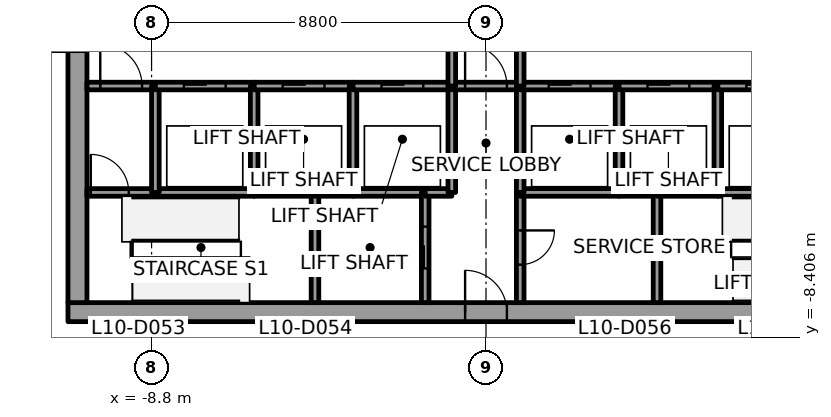
"""IFC4 building model, lengths in metres.
Left out: names, types, materials, properties, quantities, classifications, styles, units other than length and angle.
Written with IfcOpenShell. Run it as: python <this file> out.ifc"""

import sys

from ifc_helpers import new_model, si_unit, direction, frame, frame_2d, origin, place, context, subcontext, project, spatial, rectangle, extrude, element, fill, save


model = new_model("IFC4")
c1 = context("Model", 3, precision=1e-05, world=origin(), true_north=direction((0.0, 1.0)))
c2 = subcontext(c1, "Body", "Model", "MODEL_VIEW")
j1 = project(units=[si_unit("LENGTHUNIT", "METRE"), si_unit("PLANEANGLEUNIT", "RADIAN")], contexts=[c1])
p1 = place(None, origin())
s1 = spatial("IfcSite", under=j1, at=p1, CompositionType="ELEMENT")
p2 = place(p1, origin())
s2 = spatial("IfcBuilding", under=s1, at=p2, CompositionType="ELEMENT")
p3 = place(p2, frame((0.0, 0.0, 59.1)))
s3 = spatial("IfcBuildingStorey", under=s2, at=p3, CompositionType="ELEMENT", Elevation=59.1)
p4 = place(p3, frame((-11.0, -7.75, 0.0), z_axis=(0.0, 0.0, 1.0), x_axis=(1.0, 0.0, 0.0)))
e1 = element("IfcWall", 1, at=p4, inside=s3, PredefinedType="SHEAR", context=c2, shape_type="SweptSolid", body=[
    extrude(rectangle(XDim=22.0, YDim=0.5, at=frame_2d((11.0, 0.0))), origin(), (0.0, 0.0, 1.0), 3.7),
])
p5 = place(p4, frame((10.45, 0.0, 0.0)))
e2 = element("IfcOpeningElement", 2, at=p5, cuts=e1, PredefinedType="OPENING", context=c2, shape_type="SweptSolid", body=[
    extrude(rectangle(XDim=1.1, YDim=2.1, at=frame_2d((0.55, 1.05))), frame((0.0, 0.25, 0.0), z_axis=(0.0, -1.0, 0.0), x_axis=(1.0, 0.0, 0.0)), (0.0, 0.0, 1.0), 0.5),
])
p6 = place(p3, frame((-10.75, -7.5, 0.0), z_axis=(0.0, 0.0, 1.0), x_axis=(0.0, 1.0, 0.0)))
e3 = element("IfcWall", 3, at=p6, inside=s3, PredefinedType="SHEAR", context=c2, shape_type="SweptSolid", body=[
    extrude(rectangle(XDim=15.0, YDim=0.5, at=frame_2d((7.5, 0.0))), origin(), (0.0, 0.0, 1.0), 3.7),
])
p7 = place(p6, frame((6.6, 0.0, 0.0)))
e4 = element("IfcOpeningElement", 4, at=p7, cuts=e3, PredefinedType="OPENING", context=c2, shape_type="SweptSolid", body=[
    extrude(rectangle(XDim=1.8, YDim=2.1, at=frame_2d((0.9, 1.05))), frame((0.0, 0.25, 0.0), z_axis=(0.0, -1.0, 0.0), x_axis=(1.0, 0.0, 0.0)), (0.0, 0.0, 1.0), 0.5),
])
p8 = place(p3, frame((-10.5, -4.6, 0.0), z_axis=(0.0, 0.0, 1.0), x_axis=(1.0, 0.0, 0.0)))
e5 = element("IfcWall", 5, at=p8, inside=s3, PredefinedType="SOLIDWALL", context=c2, shape_type="SweptSolid", body=[
    extrude(rectangle(XDim=1.8, YDim=0.2, at=frame_2d((0.9, 0.0))), origin(), (0.0, 0.0, 1.0), 3.55),
])
p9 = place(p8, frame((0.1, 0.0, 0.0)))
e6 = element("IfcOpeningElement", 6, at=p9, cuts=e5, PredefinedType="OPENING", context=c2, shape_type="SweptSolid", body=[
    extrude(rectangle(XDim=1.0, YDim=2.1, at=frame_2d((0.5, 1.05))), frame((0.0, 0.1, 0.0), z_axis=(0.0, -1.0, 0.0), x_axis=(1.0, 0.0, 0.0)), (0.0, 0.0, 1.0), 0.2),
])
p10 = place(p3, frame((-10.5, -1.8, 0.0), z_axis=(0.0, 0.0, 1.0), x_axis=(1.0, 0.0, 0.0)))
e7 = element("IfcWall", 7, at=p10, inside=s3, PredefinedType="SOLIDWALL", context=c2, shape_type="SweptSolid", body=[
    extrude(rectangle(XDim=1.8, YDim=0.2, at=frame_2d((0.9, 0.0))), origin(), (0.0, 0.0, 1.0), 3.55),
])
p11 = place(p10, frame((0.35, 0.0, 0.0)))
e8 = element("IfcOpeningElement", 8, at=p11, cuts=e7, PredefinedType="OPENING", context=c2, shape_type="SweptSolid", body=[
    extrude(rectangle(XDim=1.1, YDim=2.1, at=frame_2d((0.55, 1.05))), frame((0.0, 0.1, 0.0), z_axis=(0.0, -1.0, 0.0), x_axis=(1.0, 0.0, 0.0)), (0.0, 0.0, 1.0), 0.2),
])
p12 = place(p3, frame((-8.7, -4.6, 0.0), z_axis=(0.0, 0.0, 1.0), x_axis=(1.0, 0.0, 0.0)))
e9 = element("IfcWall", 9, at=p12, inside=s3, PredefinedType="SOLIDWALL", context=c2, shape_type="SweptSolid", body=[
    extrude(rectangle(XDim=2.6, YDim=0.2, at=frame_2d((1.3, 0.0))), origin(), (0.0, 0.0, 1.0), 3.55),
])
p13 = place(p3, frame((-8.7, -4.6, 0.0), z_axis=(0.0, 0.0, 1.0), x_axis=(0.0, 1.0, 0.0)))
e10 = element("IfcWall", 10, at=p13, inside=s3, PredefinedType="SOLIDWALL", context=c2, shape_type="SweptSolid", body=[
    extrude(rectangle(XDim=2.8, YDim=0.2, at=frame_2d((1.4, 0.0))), origin(), (0.0, 0.0, 1.0), 3.55),
])
p14 = place(p3, frame((-8.7, -1.8, 0.0), z_axis=(0.0, 0.0, 1.0), x_axis=(1.0, 0.0, 0.0)))
e11 = element("IfcWall", 11, at=p14, inside=s3, PredefinedType="SOLIDWALL", context=c2, shape_type="SweptSolid", body=[
    extrude(rectangle(XDim=2.6, YDim=0.2, at=frame_2d((1.3, 0.0))), origin(), (0.0, 0.0, 1.0), 3.55),
])
p15 = place(p14, frame((0.75, 0.0, 0.0)))
e12 = element("IfcOpeningElement", 12, at=p15, cuts=e11, PredefinedType="OPENING", context=c2, shape_type="SweptSolid", body=[
    extrude(rectangle(XDim=1.1, YDim=2.1, at=frame_2d((0.55, 1.05))), frame((0.0, 0.1, 0.0), z_axis=(0.0, -1.0, 0.0), x_axis=(1.0, 0.0, 0.0)), (0.0, 0.0, 1.0), 0.2),
])
p16 = place(p3, frame((-6.1, -4.6, 0.0), z_axis=(0.0, 0.0, 1.0), x_axis=(1.0, 0.0, 0.0)))
e13 = element("IfcWall", 13, at=p16, inside=s3, PredefinedType="SOLIDWALL", context=c2, shape_type="SweptSolid", body=[
    extrude(rectangle(XDim=1.6, YDim=0.2, at=frame_2d((0.8, 0.0))), origin(), (0.0, 0.0, 1.0), 3.55),
])
p17 = place(p3, frame((-6.1, -4.6, 0.0), z_axis=(0.0, 0.0, 1.0), x_axis=(0.0, 1.0, 0.0)))
e14 = element("IfcWall", 14, at=p17, inside=s3, PredefinedType="SOLIDWALL", context=c2, shape_type="SweptSolid", body=[
    extrude(rectangle(XDim=2.8, YDim=0.2, at=frame_2d((1.4, 0.0))), origin(), (0.0, 0.0, 1.0), 3.55),
])
p18 = place(p3, frame((-6.1, -1.8, 0.0), z_axis=(0.0, 0.0, 1.0), x_axis=(1.0, 0.0, 0.0)))
e15 = element("IfcWall", 15, at=p18, inside=s3, PredefinedType="SOLIDWALL", context=c2, shape_type="SweptSolid", body=[
    extrude(rectangle(XDim=2.6, YDim=0.2, at=frame_2d((1.3, 0.0))), origin(), (0.0, 0.0, 1.0), 3.55),
])
p19 = place(p18, frame((0.75, 0.0, 0.0)))
e16 = element("IfcOpeningElement", 16, at=p19, cuts=e15, PredefinedType="OPENING", context=c2, shape_type="SweptSolid", body=[
    extrude(rectangle(XDim=1.1, YDim=2.1, at=frame_2d((0.55, 1.05))), frame((0.0, 0.1, 0.0), z_axis=(0.0, -1.0, 0.0), x_axis=(1.0, 0.0, 0.0)), (0.0, 0.0, 1.0), 0.2),
])
p20 = place(p3, frame((-4.5, -4.6, 0.0), z_axis=(0.0, 0.0, 1.0), x_axis=(0.0, -1.0, 0.0)))
e17 = element("IfcWall", 17, at=p20, inside=s3, PredefinedType="SOLIDWALL", context=c2, shape_type="SweptSolid", body=[
    extrude(rectangle(XDim=2.9, YDim=0.2, at=frame_2d((1.45, 0.0))), origin(), (0.0, 0.0, 1.0), 3.55),
])
p21 = place(p3, frame((-4.5, -4.6, 0.0), z_axis=(0.0, 0.0, 1.0), x_axis=(1.0, 0.0, 0.0)))
e18 = element("IfcWall", 18, at=p21, inside=s3, PredefinedType="SOLIDWALL", context=c2, shape_type="SweptSolid", body=[
    extrude(rectangle(XDim=1.0, YDim=0.2, at=frame_2d((0.5, 0.0))), origin(), (0.0, 0.0, 1.0), 3.55),
])
p22 = place(p3, frame((-3.5, -4.6, 0.0), z_axis=(0.0, 0.0, 1.0), x_axis=(1.0, 0.0, 0.0)))
e19 = element("IfcWall", 19, at=p22, inside=s3, PredefinedType="SOLIDWALL", context=c2, shape_type="SweptSolid", body=[
    extrude(rectangle(XDim=1.9, YDim=0.2, at=frame_2d((0.95, 0.0))), origin(), (0.0, 0.0, 1.0), 3.55),
])
p23 = place(p3, frame((-3.5, -4.6, 0.0), z_axis=(0.0, 0.0, 1.0), x_axis=(0.0, 1.0, 0.0)))
e20 = element("IfcWall", 20, at=p23, inside=s3, PredefinedType="SOLIDWALL", context=c2, shape_type="SweptSolid", body=[
    extrude(rectangle(XDim=2.8, YDim=0.2, at=frame_2d((1.4, 0.0))), origin(), (0.0, 0.0, 1.0), 3.55),
])
p24 = place(p3, frame((-3.5, -1.8, 0.0), z_axis=(0.0, 0.0, 1.0), x_axis=(1.0, 0.0, 0.0)))
e21 = element("IfcWall", 21, at=p24, inside=s3, PredefinedType="SOLIDWALL", context=c2, shape_type="SweptSolid", body=[
    extrude(rectangle(XDim=2.6, YDim=0.2, at=frame_2d((1.3, 0.0))), origin(), (0.0, 0.0, 1.0), 3.55),
])
p25 = place(p24, frame((0.75, 0.0, 0.0)))
e22 = element("IfcOpeningElement", 22, at=p25, cuts=e21, PredefinedType="OPENING", context=c2, shape_type="SweptSolid", body=[
    extrude(rectangle(XDim=1.1, YDim=2.1, at=frame_2d((0.55, 1.05))), frame((0.0, 0.1, 0.0), z_axis=(0.0, -1.0, 0.0), x_axis=(1.0, 0.0, 0.0)), (0.0, 0.0, 1.0), 0.2),
])
p26 = place(p3, frame((-1.6, -7.5, 0.0), z_axis=(0.0, 0.0, 1.0), x_axis=(0.0, 1.0, 0.0)))
e23 = element("IfcWall", 23, at=p26, inside=s3, PredefinedType="SOLIDWALL", context=c2, shape_type="SweptSolid", body=[
    extrude(rectangle(XDim=2.9, YDim=0.2, at=frame_2d((1.45, 0.0))), origin(), (0.0, 0.0, 1.0), 3.55),
])
p27 = place(p26, frame((0.9, 0.0, 0.0)))
e24 = element("IfcOpeningElement", 24, at=p27, cuts=e23, PredefinedType="OPENING", context=c2, shape_type="SweptSolid", body=[
    extrude(rectangle(XDim=1.1, YDim=2.1, at=frame_2d((0.55, 1.05))), frame((0.0, 0.1, 0.0), z_axis=(0.0, -1.0, 0.0), x_axis=(1.0, 0.0, 0.0)), (0.0, 0.0, 1.0), 0.2),
])
p28 = place(p3, frame((-1.6, -4.6, 0.0), z_axis=(0.0, 0.0, 1.0), x_axis=(1.0, 0.0, 0.0)))
e25 = element("IfcWall", 25, at=p28, inside=s3, PredefinedType="SOLIDWALL", context=c2, shape_type="SweptSolid", body=[
    extrude(rectangle(XDim=0.7, YDim=0.2, at=frame_2d((0.35, 0.0))), origin(), (0.0, 0.0, 1.0), 3.55),
])
p29 = place(p3, frame((-0.9, -4.6, 0.0), z_axis=(0.0, 0.0, 1.0), x_axis=(0.0, 1.0, 0.0)))
e26 = element("IfcWall", 26, at=p29, inside=s3, PredefinedType="SOLIDWALL", context=c2, shape_type="SweptSolid", body=[
    extrude(rectangle(XDim=2.8, YDim=0.2, at=frame_2d((1.4, 0.0))), origin(), (0.0, 0.0, 1.0), 3.55),
])
p30 = place(p3, frame((-0.9, -1.8, 0.0), z_axis=(0.0, 0.0, 1.0), x_axis=(1.0, 0.0, 0.0)))
e27 = element("IfcWall", 27, at=p30, inside=s3, PredefinedType="SOLIDWALL", context=c2, shape_type="SweptSolid", body=[
    extrude(rectangle(XDim=1.8, YDim=0.2, at=frame_2d((0.9, 0.0))), origin(), (0.0, 0.0, 1.0), 3.55),
])
p31 = place(p30, frame((0.35, 0.0, 0.0)))
e28 = element("IfcOpeningElement", 28, at=p31, cuts=e27, PredefinedType="OPENING", context=c2, shape_type="SweptSolid", body=[
    extrude(rectangle(XDim=1.1, YDim=2.1, at=frame_2d((0.55, 1.05))), frame((0.0, 0.1, 0.0), z_axis=(0.0, -1.0, 0.0), x_axis=(1.0, 0.0, 0.0)), (0.0, 0.0, 1.0), 0.2),
])
p32 = place(p3, frame((-0.9, 1.8, 0.0), z_axis=(0.0, 0.0, 1.0), x_axis=(0.0, -1.0, 0.0)))
e29 = element("IfcWall", 29, at=p32, inside=s3, PredefinedType="SOLIDWALL", context=c2, shape_type="SweptSolid", body=[
    extrude(rectangle(XDim=3.6, YDim=0.2, at=frame_2d((1.8, 0.0))), origin(), (0.0, 0.0, 1.0), 3.55),
])
p33 = place(p32, frame((1.05, 0.0, 0.0)))
e30 = element("IfcOpeningElement", 30, at=p33, cuts=e29, PredefinedType="OPENING", context=c2, shape_type="SweptSolid", body=[
    extrude(rectangle(XDim=1.5, YDim=2.1, at=frame_2d((0.75, 1.05))), frame((0.0, 0.1, 0.0), z_axis=(0.0, -1.0, 0.0), x_axis=(1.0, 0.0, 0.0)), (0.0, 0.0, 1.0), 0.2),
])
p34 = place(p3, frame((0.9, -4.6, 0.0), z_axis=(0.0, 0.0, 1.0), x_axis=(0.0, -1.0, 0.0)))
e31 = element("IfcWall", 31, at=p34, inside=s3, PredefinedType="SOLIDWALL", context=c2, shape_type="SweptSolid", body=[
    extrude(rectangle(XDim=2.9, YDim=0.2, at=frame_2d((1.45, 0.0))), origin(), (0.0, 0.0, 1.0), 3.55),
])
p35 = place(p34, frame((1.0, 0.0, 0.0)))
e32 = element("IfcOpeningElement", 32, at=p35, cuts=e31, PredefinedType="OPENING", context=c2, shape_type="SweptSolid", body=[
    extrude(rectangle(XDim=0.9, YDim=2.1, at=frame_2d((0.45, 1.05))), frame((0.0, 0.1, 0.0), z_axis=(0.0, -1.0, 0.0), x_axis=(1.0, 0.0, 0.0)), (0.0, 0.0, 1.0), 0.2),
])
p36 = place(p3, frame((3.5, -4.6, 0.0), z_axis=(0.0, 0.0, 1.0), x_axis=(-1.0, 0.0, 0.0)))
e33 = element("IfcWall", 33, at=p36, inside=s3, PredefinedType="SOLIDWALL", context=c2, shape_type="SweptSolid", body=[
    extrude(rectangle(XDim=2.6, YDim=0.2, at=frame_2d((1.3, 0.0))), origin(), (0.0, 0.0, 1.0), 3.55),
])
p37 = place(p3, frame((0.9, -1.8, 0.0), z_axis=(0.0, 0.0, 1.0), x_axis=(0.0, -1.0, 0.0)))
e34 = element("IfcWall", 34, at=p37, inside=s3, PredefinedType="SOLIDWALL", context=c2, shape_type="SweptSolid", body=[
    extrude(rectangle(XDim=2.8, YDim=0.2, at=frame_2d((1.4, 0.0))), origin(), (0.0, 0.0, 1.0), 3.55),
])
p38 = place(p3, frame((0.9, -1.8, 0.0), z_axis=(0.0, 0.0, 1.0), x_axis=(1.0, 0.0, 0.0)))
e35 = element("IfcWall", 35, at=p38, inside=s3, PredefinedType="SOLIDWALL", context=c2, shape_type="SweptSolid", body=[
    extrude(rectangle(XDim=2.6, YDim=0.2, at=frame_2d((1.3, 0.0))), origin(), (0.0, 0.0, 1.0), 3.55),
])
p39 = place(p38, frame((0.75, 0.0, 0.0)))
e36 = element("IfcOpeningElement", 36, at=p39, cuts=e35, PredefinedType="OPENING", context=c2, shape_type="SweptSolid", body=[
    extrude(rectangle(XDim=1.1, YDim=2.1, at=frame_2d((0.55, 1.05))), frame((0.0, 0.1, 0.0), z_axis=(0.0, -1.0, 0.0), x_axis=(1.0, 0.0, 0.0)), (0.0, 0.0, 1.0), 0.2),
])
p40 = place(p3, frame((0.9, -1.8, 0.0), z_axis=(0.0, 0.0, 1.0), x_axis=(0.0, 1.0, 0.0)))
e37 = element("IfcWall", 37, at=p40, inside=s3, PredefinedType="SOLIDWALL", context=c2, shape_type="SweptSolid", body=[
    extrude(rectangle(XDim=3.6, YDim=0.2, at=frame_2d((1.8, 0.0))), origin(), (0.0, 0.0, 1.0), 3.55),
])
p41 = place(p40, frame((1.05, 0.0, 0.0)))
e38 = element("IfcOpeningElement", 38, at=p41, cuts=e37, PredefinedType="OPENING", context=c2, shape_type="SweptSolid", body=[
    extrude(rectangle(XDim=1.5, YDim=2.1, at=frame_2d((0.75, 1.05))), frame((0.0, 0.1, 0.0), z_axis=(0.0, -1.0, 0.0), x_axis=(1.0, 0.0, 0.0)), (0.0, 0.0, 1.0), 0.2),
])
p42 = place(p3, frame((4.5, -4.6, 0.0), z_axis=(0.0, 0.0, 1.0), x_axis=(-1.0, 0.0, 0.0)))
e39 = element("IfcWall", 39, at=p42, inside=s3, PredefinedType="SOLIDWALL", context=c2, shape_type="SweptSolid", body=[
    extrude(rectangle(XDim=1.0, YDim=0.2, at=frame_2d((0.5, 0.0))), origin(), (0.0, 0.0, 1.0), 3.55),
])
p43 = place(p3, frame((3.5, -4.6, 0.0), z_axis=(0.0, 0.0, 1.0), x_axis=(0.0, 1.0, 0.0)))
e40 = element("IfcWall", 40, at=p43, inside=s3, PredefinedType="SOLIDWALL", context=c2, shape_type="SweptSolid", body=[
    extrude(rectangle(XDim=2.8, YDim=0.2, at=frame_2d((1.4, 0.0))), origin(), (0.0, 0.0, 1.0), 3.55),
])
p44 = place(p3, frame((3.5, -1.8, 0.0), z_axis=(0.0, 0.0, 1.0), x_axis=(1.0, 0.0, 0.0)))
e41 = element("IfcWall", 41, at=p44, inside=s3, PredefinedType="SOLIDWALL", context=c2, shape_type="SweptSolid", body=[
    extrude(rectangle(XDim=2.6, YDim=0.2, at=frame_2d((1.3, 0.0))), origin(), (0.0, 0.0, 1.0), 3.55),
])
p45 = place(p44, frame((0.75, 0.0, 0.0)))
e42 = element("IfcOpeningElement", 42, at=p45, cuts=e41, PredefinedType="OPENING", context=c2, shape_type="SweptSolid", body=[
    extrude(rectangle(XDim=1.1, YDim=2.1, at=frame_2d((0.55, 1.05))), frame((0.0, 0.1, 0.0), z_axis=(0.0, -1.0, 0.0), x_axis=(1.0, 0.0, 0.0)), (0.0, 0.0, 1.0), 0.2),
])
p46 = place(p3, frame((4.5, -7.5, 0.0), z_axis=(0.0, 0.0, 1.0), x_axis=(0.0, 1.0, 0.0)))
e43 = element("IfcWall", 43, at=p46, inside=s3, PredefinedType="SOLIDWALL", context=c2, shape_type="SweptSolid", body=[
    extrude(rectangle(XDim=2.9, YDim=0.2, at=frame_2d((1.45, 0.0))), origin(), (0.0, 0.0, 1.0), 3.55),
])
p47 = place(p3, frame((4.5, -4.6, 0.0), z_axis=(0.0, 0.0, 1.0), x_axis=(1.0, 0.0, 0.0)))
e44 = element("IfcWall", 44, at=p47, inside=s3, PredefinedType="SOLIDWALL", context=c2, shape_type="SweptSolid", body=[
    extrude(rectangle(XDim=1.6, YDim=0.2, at=frame_2d((0.8, 0.0))), origin(), (0.0, 0.0, 1.0), 3.55),
])
p48 = place(p3, frame((6.1, -4.6, 0.0), z_axis=(0.0, 0.0, 1.0), x_axis=(1.0, 0.0, 0.0)))
e45 = element("IfcWall", 45, at=p48, inside=s3, PredefinedType="SOLIDWALL", context=c2, shape_type="SweptSolid", body=[
    extrude(rectangle(XDim=2.6, YDim=0.2, at=frame_2d((1.3, 0.0))), origin(), (0.0, 0.0, 1.0), 3.55),
])
p49 = place(p3, frame((6.1, -4.6, 0.0), z_axis=(0.0, 0.0, 1.0), x_axis=(0.0, 1.0, 0.0)))
e46 = element("IfcWall", 46, at=p49, inside=s3, PredefinedType="SOLIDWALL", context=c2, shape_type="SweptSolid", body=[
    extrude(rectangle(XDim=2.8, YDim=0.2, at=frame_2d((1.4, 0.0))), origin(), (0.0, 0.0, 1.0), 3.55),
])
p50 = place(p3, frame((6.1, -1.8, 0.0), z_axis=(0.0, 0.0, 1.0), x_axis=(1.0, 0.0, 0.0)))
e47 = element("IfcWall", 47, at=p50, inside=s3, PredefinedType="SOLIDWALL", context=c2, shape_type="SweptSolid", body=[
    extrude(rectangle(XDim=2.6, YDim=0.2, at=frame_2d((1.3, 0.0))), origin(), (0.0, 0.0, 1.0), 3.55),
])
p51 = place(p50, frame((0.75, 0.0, 0.0)))
e48 = element("IfcOpeningElement", 48, at=p51, cuts=e47, PredefinedType="OPENING", context=c2, shape_type="SweptSolid", body=[
    extrude(rectangle(XDim=1.1, YDim=2.1, at=frame_2d((0.55, 1.05))), frame((0.0, 0.1, 0.0), z_axis=(0.0, -1.0, 0.0), x_axis=(1.0, 0.0, 0.0)), (0.0, 0.0, 1.0), 0.2),
])
p52 = place(p15, origin())
e49 = element("IfcDoor", 49, at=p52, inside=s3, OperationType="SLIDING_TO_LEFT", PredefinedType="DOOR", context=c2, shape_type="SweptSolid", body=[
    extrude(rectangle(XDim=1.1, YDim=2.1, at=frame_2d((0.55, 1.05))), frame((0.0, 0.025, 0.0), z_axis=(0.0, -1.0, 0.0), x_axis=(1.0, 0.0, 0.0)), (0.0, 0.0, 1.0), 0.05),
])
fill(e12, e49)
p53 = place(p19, origin())
e50 = element("IfcDoor", 50, at=p53, inside=s3, OperationType="SLIDING_TO_RIGHT", PredefinedType="DOOR", context=c2, shape_type="SweptSolid", body=[
    extrude(rectangle(XDim=1.1, YDim=2.1, at=frame_2d((0.55, 1.05))), frame((0.0, 0.025, 0.0), z_axis=(0.0, -1.0, 0.0), x_axis=(1.0, 0.0, 0.0)), (0.0, 0.0, 1.0), 0.05),
])
fill(e16, e50)
p54 = place(p25, origin())
e51 = element("IfcDoor", 51, at=p54, inside=s3, OperationType="SLIDING_TO_RIGHT", PredefinedType="DOOR", context=c2, shape_type="SweptSolid", body=[
    extrude(rectangle(XDim=1.1, YDim=2.1, at=frame_2d((0.55, 1.05))), frame((0.0, 0.025, 0.0), z_axis=(0.0, -1.0, 0.0), x_axis=(1.0, 0.0, 0.0)), (0.0, 0.0, 1.0), 0.05),
])
fill(e22, e51)
p55 = place(p39, origin())
e52 = element("IfcDoor", 52, at=p55, inside=s3, OperationType="SLIDING_TO_RIGHT", PredefinedType="DOOR", context=c2, shape_type="SweptSolid", body=[
    extrude(rectangle(XDim=1.1, YDim=2.1, at=frame_2d((0.55, 1.05))), frame((0.0, 0.025, 0.0), z_axis=(0.0, -1.0, 0.0), x_axis=(1.0, 0.0, 0.0)), (0.0, 0.0, 1.0), 0.05),
])
fill(e36, e52)
p56 = place(p45, origin())
e53 = element("IfcDoor", 53, at=p56, inside=s3, OperationType="SLIDING_TO_LEFT", PredefinedType="DOOR", context=c2, shape_type="SweptSolid", body=[
    extrude(rectangle(XDim=1.1, YDim=2.1, at=frame_2d((0.55, 1.05))), frame((0.0, 0.025, 0.0), z_axis=(0.0, -1.0, 0.0), x_axis=(1.0, 0.0, 0.0)), (0.0, 0.0, 1.0), 0.05),
])
fill(e42, e53)
p57 = place(p51, origin())
e54 = element("IfcDoor", 54, at=p57, inside=s3, OperationType="SLIDING_TO_LEFT", PredefinedType="DOOR", context=c2, shape_type="SweptSolid", body=[
    extrude(rectangle(XDim=1.1, YDim=2.1, at=frame_2d((0.55, 1.05))), frame((0.0, 0.025, 0.0), z_axis=(0.0, -1.0, 0.0), x_axis=(1.0, 0.0, 0.0)), (0.0, 0.0, 1.0), 0.05),
])
fill(e48, e54)
p58 = place(p27, origin())
e55 = element("IfcDoor", 55, at=p58, inside=s3, OperationType="SLIDING_TO_RIGHT", PredefinedType="DOOR", context=c2, shape_type="SweptSolid", body=[
    extrude(rectangle(XDim=1.1, YDim=2.1, at=frame_2d((0.55, 1.05))), frame((0.0, 0.025, 0.0), z_axis=(0.0, -1.0, 0.0), x_axis=(1.0, 0.0, 0.0)), (0.0, 0.0, 1.0), 0.05),
])
fill(e24, e55)
p59 = place(p11, origin())
e56 = element("IfcDoor", 56, at=p59, inside=s3, OperationType="SINGLE_SWING_LEFT", PredefinedType="DOOR", context=c2, shape_type="SweptSolid", body=[
    extrude(rectangle(XDim=1.1, YDim=2.1, at=frame_2d((0.55, 1.05))), frame((0.0, 0.025, 0.0), z_axis=(0.0, -1.0, 0.0), x_axis=(1.0, 0.0, 0.0)), (0.0, 0.0, 1.0), 0.05),
])
fill(e8, e56)
p60 = place(p31, origin())
e57 = element("IfcDoor", 57, at=p60, inside=s3, OperationType="SINGLE_SWING_LEFT", PredefinedType="DOOR", context=c2, shape_type="SweptSolid", body=[
    extrude(rectangle(XDim=1.1, YDim=2.1, at=frame_2d((0.55, 1.05))), frame((0.0, 0.025, 0.0), z_axis=(0.0, -1.0, 0.0), x_axis=(1.0, 0.0, 0.0)), (0.0, 0.0, 1.0), 0.05),
])
fill(e28, e57)
p61 = place(p9, origin())
e58 = element("IfcDoor", 58, at=p61, inside=s3, OperationType="SINGLE_SWING_LEFT", PredefinedType="DOOR", context=c2, shape_type="SweptSolid", body=[
    extrude(rectangle(XDim=1.0, YDim=2.1, at=frame_2d((0.5, 1.05))), frame((0.0, 0.025, 0.0), z_axis=(0.0, -1.0, 0.0), x_axis=(1.0, 0.0, 0.0)), (0.0, 0.0, 1.0), 0.05),
])
fill(e6, e58)
p62 = place(p35, origin())
e59 = element("IfcDoor", 59, at=p62, inside=s3, OperationType="SINGLE_SWING_RIGHT", PredefinedType="DOOR", context=c2, shape_type="SweptSolid", body=[
    extrude(rectangle(XDim=0.9, YDim=2.1, at=frame_2d((0.45, 1.05))), frame((0.0, 0.025, 0.0), z_axis=(0.0, -1.0, 0.0), x_axis=(1.0, 0.0, 0.0)), (0.0, 0.0, 1.0), 0.05),
])
fill(e32, e59)
p63 = place(p7, origin())
e60 = element("IfcDoor", 60, at=p63, inside=s3, OperationType="DOUBLE_DOOR_SINGLE_SWING", PredefinedType="DOOR", context=c2, shape_type="SweptSolid", body=[
    extrude(rectangle(XDim=1.8, YDim=2.1, at=frame_2d((0.9, 1.05))), frame((0.0, 0.025, 0.0), z_axis=(0.0, -1.0, 0.0), x_axis=(1.0, 0.0, 0.0)), (0.0, 0.0, 1.0), 0.05),
])
fill(e4, e60)
p64 = place(p5, origin())
e61 = element("IfcDoor", 61, at=p64, inside=s3, OperationType="SINGLE_SWING_LEFT", PredefinedType="DOOR", context=c2, shape_type="SweptSolid", body=[
    extrude(rectangle(XDim=1.1, YDim=2.1, at=frame_2d((0.55, 1.05))), frame((0.0, 0.025, 0.0), z_axis=(0.0, -1.0, 0.0), x_axis=(1.0, 0.0, 0.0)), (0.0, 0.0, 1.0), 0.05),
])
fill(e2, e61)
save(model, sys.argv[1])
